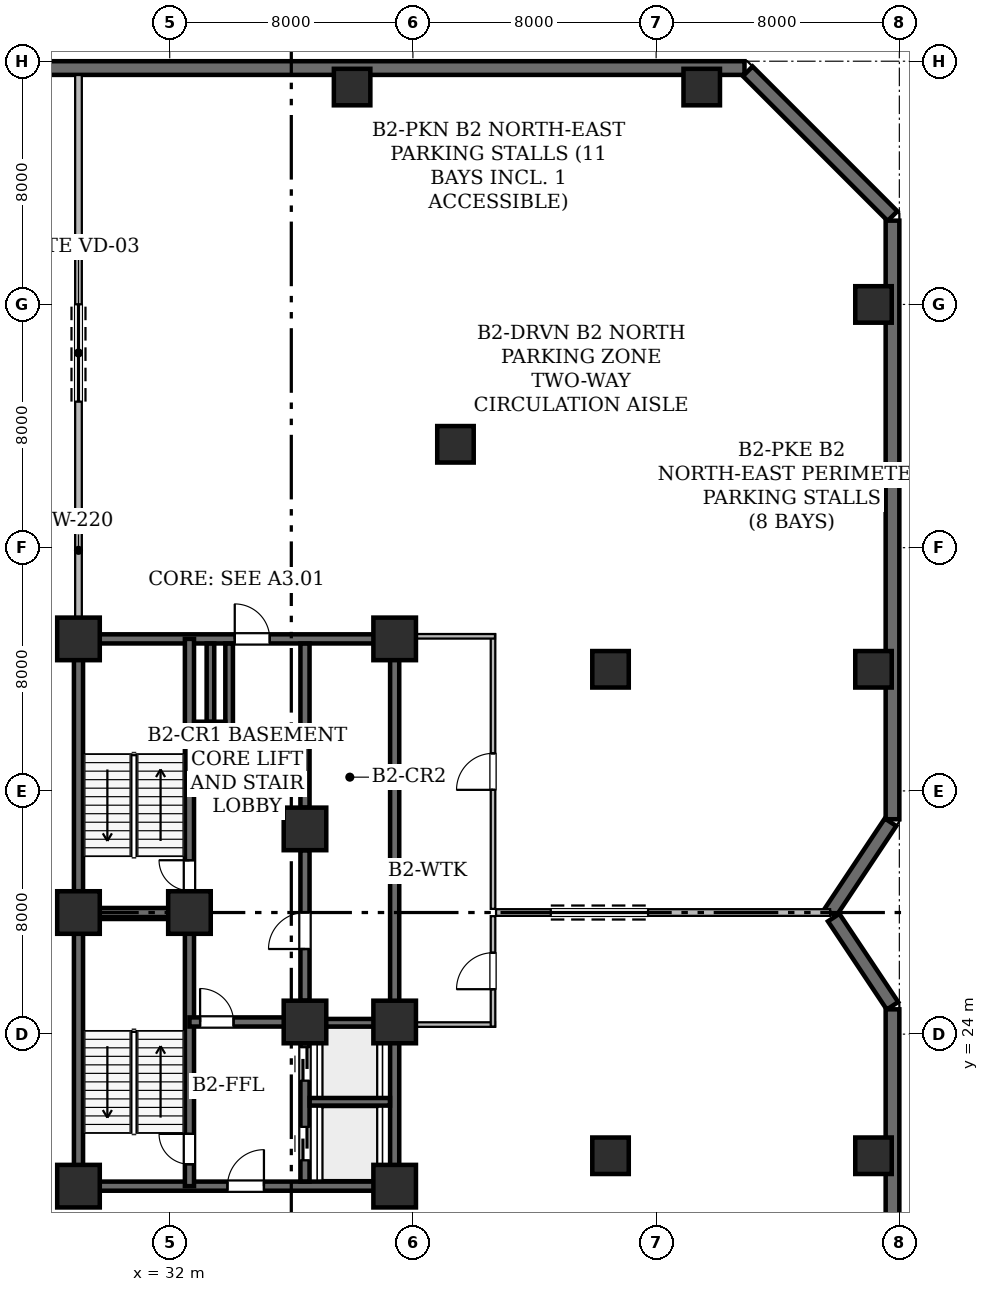
"""IFC4 building model, lengths in metres.
Left out: names, types, materials, properties, quantities, classifications, styles, units other than length and angle.
Written with IfcOpenShell. Run it as: python <this file> out.ifc"""

import sys

from ifc_helpers import new_model, si_unit, direction, frame, frame_2d, origin, origin_2d, place, context, subcontext, project, spatial, rectangle, hollow_rectangle, extrude, element, fill, save


model = new_model("IFC4")
c1 = context("Model", 3, precision=1e-05, world=origin(), true_north=direction((0.0, 1.0)))
c2 = subcontext(c1, "Body", "Model", "MODEL_VIEW")
j1 = project(units=[si_unit("LENGTHUNIT", "METRE"), si_unit("PLANEANGLEUNIT", "RADIAN")], contexts=[c1])
p1 = place(None, origin())
s1 = spatial("IfcSite", under=j1, at=p1, CompositionType="ELEMENT")
p2 = place(p1, origin())
s2 = spatial("IfcBuilding", under=s1, at=p2, CompositionType="ELEMENT")
p3 = place(p2, frame((0.0, 0.0, -9.0)))
s3 = spatial("IfcBuildingStorey", under=s2, at=p3, CompositionType="ELEMENT", Elevation=-9.0)
for number, where, z_axis, x_axis in (
    (1, (29.0, 19.0, 0.0), (0.0, 0.0, 1.0), (1.0, 0.0, 0.0)),
    (2, (32.65, 28.0, 0.0), (0.0, 0.0, 1.0), (1.0, 0.0, 0.0)),
    (3, (39.4, 19.0, 0.0), (0.0, 0.0, 1.0), (1.0, 0.0, 0.0)),
    (4, (29.0, 28.0, 0.0), (0.0, 0.0, 1.0), (1.0, 0.0, 0.0)),
    (5, (36.45, 24.4, 0.0), (0.0, 0.0, 1.0), (1.0, 0.0, 0.0)),
    (6, (39.4, 24.4, 0.0), (0.0, 0.0, 1.0), (1.0, 0.0, 0.0)),
    (7, (29.0, 37.0, 0.0), (0.0, 0.0, 1.0), (1.0, 0.0, 0.0)),
    (8, (36.45, 30.75, 0.0), (0.0, 0.0, 1.0), (1.0, 0.0, 0.0)),
    (9, (39.4, 37.0, 0.0), (0.0, 0.0, 1.0), (1.0, 0.0, 0.0)),
):
    element("IfcColumn", number, at=place(p3, frame(where, z_axis=z_axis, x_axis=x_axis)), inside=s3, PredefinedType="COLUMN", context=c2, shape_type="SweptSolid", body=[
        extrude(hollow_rectangle(XDim=1.4, YDim=1.4, WallThickness=0.07, at=origin_2d()), origin(), (0.0, 0.0, 1.0), 4.5),
    ])
for number, where, z_axis, x_axis in (
    (10, (38.0, 55.15, 0.0), (0.0, 0.0, 1.0), (1.0, 0.0, 0.0)),
    (11, (49.5, 55.15, 0.0), (0.0, 0.0, 1.0), (1.0, 0.0, 0.0)),
    (12, (55.15, 20.0, 0.0), (0.0, 0.0, 1.0), (1.0, 0.0, 0.0)),
    (13, (55.15, 36.0, 0.0), (0.0, 0.0, 1.0), (1.0, 0.0, 0.0)),
    (14, (55.15, 48.0, 0.0), (0.0, 0.0, 1.0), (1.0, 0.0, 0.0)),
    (15, (41.4, 43.4, 0.0), (0.0, 0.0, 1.0), (1.0, 0.0, 0.0)),
    (16, (46.5, 20.0, 0.0), (0.0, 0.0, 1.0), (1.0, 0.0, 0.0)),
    (17, (46.5, 36.0, 0.0), (0.0, 0.0, 1.0), (1.0, 0.0, 0.0)),
):
    element("IfcColumn", number, at=place(p3, frame(where, z_axis=z_axis, x_axis=x_axis)), inside=s3, PredefinedType="COLUMN", context=c2, shape_type="SweptSolid", body=[
        extrude(hollow_rectangle(XDim=1.2, YDim=1.2, WallThickness=0.06, at=origin_2d()), origin(), (0.0, 0.0, 1.0), 4.5),
    ])
p4 = place(p3, frame((5.243, 55.775, 0.0), z_axis=(0.0, 0.0, 1.0), x_axis=(1.0, 0.0, 0.0)))
e18 = element("IfcWall", 18, at=p4, inside=s3, PredefinedType="USERDEFINED", context=c2, shape_type="SweptSolid", body=[
    extrude(rectangle(XDim=45.664, YDim=0.45, at=frame_2d((22.832, 0.0))), origin(), (0.0, 0.0, 1.0), 4.18),
])
p5 = place(p3, frame((51.014, 55.668, 0.0), z_axis=(0.0, 0.0, 1.0), x_axis=(0.707106781187, -0.707106781187, 0.0)))
e19 = element("IfcWall", 19, at=p5, inside=s3, PredefinedType="USERDEFINED", context=c2, shape_type="SweptSolid", body=[
    extrude(rectangle(XDim=6.733, YDim=0.45, at=frame_2d((3.367, 0.0))), origin(), (0.0, 0.0, 1.0), 4.18),
])
p6 = place(p3, frame((55.775, 50.756, 0.0), z_axis=(0.0, 0.0, 1.0), x_axis=(0.0, -1.0, 0.0)))
e20 = element("IfcWall", 20, at=p6, inside=s3, PredefinedType="USERDEFINED", context=c2, shape_type="SweptSolid", body=[
    extrude(rectangle(XDim=19.688, YDim=0.45, at=frame_2d((9.844, 0.0))), origin(), (0.0, 0.0, 1.0), 4.18),
])
p7 = place(p3, frame((55.71, 30.971, 0.0), z_axis=(0.0, 0.0, 1.0), x_axis=(-0.554573947075, -0.832134446604, 0.0)))
e21 = element("IfcWall", 21, at=p7, inside=s3, PredefinedType="USERDEFINED", context=c2, shape_type="SweptSolid", body=[
    extrude(rectangle(XDim=3.57, YDim=0.45, at=frame_2d((1.785, 0.0))), origin(), (0.0, 0.0, 1.0), 4.18),
])
p8 = place(p3, frame((53.84, 27.835, 0.0), z_axis=(0.0, 0.0, 1.0), x_axis=(0.554587147378, -0.832125649144, 0.0)))
e22 = element("IfcWall", 22, at=p8, inside=s3, PredefinedType="USERDEFINED", context=c2, shape_type="SweptSolid", body=[
    extrude(rectangle(XDim=3.489, YDim=0.45, at=frame_2d((1.744, 0.0))), origin(), (0.0, 0.0, 1.0), 4.18),
])
p9 = place(p3, frame((55.775, 24.816, 0.0), z_axis=(0.0, 0.0, 1.0), x_axis=(0.0, -1.0, 0.0)))
e23 = element("IfcWall", 23, at=p9, inside=s3, PredefinedType="USERDEFINED", context=c2, shape_type="SweptSolid", body=[
    extrude(rectangle(XDim=19.723, YDim=0.45, at=frame_2d((9.861, 0.0))), origin(), (0.0, 0.0, 1.0), 4.18),
])
p10 = place(p3, frame((29.0, 37.154, 0.0), z_axis=(0.0, 0.0, 1.0), x_axis=(0.0, 1.0, 0.0)))
e24 = element("IfcWall", 24, at=p10, inside=s3, PredefinedType="STANDARD", context=c2, shape_type="SweptSolid", body=[
    extrude(rectangle(XDim=18.392, YDim=0.22, at=frame_2d((9.196, 0.0))), origin(), (0.0, 0.0, 1.0), 4.18),
])
p11 = place(p10, frame((7.65, 0.0, 0.0)))
e25 = element("IfcOpeningElement", 25, at=p11, cuts=e24, PredefinedType="OPENING", context=c2, shape_type="SweptSolid", body=[
    extrude(rectangle(XDim=3.2, YDim=2.7, at=frame_2d((1.6, 1.35))), frame((0.0, 0.12, 0.0), z_axis=(0.0, -1.0, 0.0), x_axis=(1.0, 0.0, 0.0)), (0.0, 0.0, 1.0), 0.24),
])
p12 = place(p3, frame((42.735, 28.0, 0.0), z_axis=(0.0, 0.0, 1.0), x_axis=(1.0, 0.0, 0.0)))
e26 = element("IfcWall", 26, at=p12, inside=s3, PredefinedType="STANDARD", context=c2, shape_type="SweptSolid", body=[
    extrude(rectangle(XDim=10.988, YDim=0.22, at=frame_2d((5.494, 0.0))), origin(), (0.0, 0.0, 1.0), 4.18),
])
p13 = place(p12, frame((1.8, 0.0, 0.0)))
e27 = element("IfcOpeningElement", 27, at=p13, cuts=e26, PredefinedType="OPENING", context=c2, shape_type="SweptSolid", body=[
    extrude(rectangle(XDim=3.2, YDim=2.7, at=frame_2d((1.6, 1.35))), frame((0.0, 0.12, 0.0), z_axis=(0.0, -1.0, 0.0), x_axis=(1.0, 0.0, 0.0)), (0.0, 0.0, 1.0), 0.24),
])
for number, where, z_axis, x_axis in (
    (28, (29.0, 19.0, 0.0), (0.0, 0.0, 1.0), (0.0, 1.0, 0.0)),
    (29, (29.0, 28.0, 0.0), (0.0, 0.0, 1.0), (0.0, 1.0, 0.0)),
):
    element("IfcWall", number, at=place(p3, frame(where, z_axis=z_axis, x_axis=x_axis)), inside=s3, PredefinedType="SHEAR", context=c2, shape_type="SweptSolid", body=[
        extrude(rectangle(XDim=9.0, YDim=0.3, at=frame_2d((4.5, 0.0))), origin(), (0.0, 0.0, 1.0), 4.18),
    ])
p14 = place(p3, frame((29.0, 19.0, 0.0), z_axis=(0.0, 0.0, 1.0), x_axis=(1.0, 0.0, 0.0)))
e30 = element("IfcWall", 30, at=p14, inside=s3, PredefinedType="SHEAR", context=c2, shape_type="SweptSolid", body=[
    extrude(rectangle(XDim=10.4, YDim=0.3, at=frame_2d((5.2, 0.0))), origin(), (0.0, 0.0, 1.0), 4.18),
])
p15 = place(p14, frame((4.9, 0.0, 0.0)))
e31 = element("IfcOpeningElement", 31, at=p15, cuts=e30, PredefinedType="OPENING", context=c2, shape_type="SweptSolid", body=[
    extrude(rectangle(XDim=1.2, YDim=2.15, at=frame_2d((0.6, 1.075))), frame((0.0, 0.16, 0.0), z_axis=(0.0, -1.0, 0.0), x_axis=(1.0, 0.0, 0.0)), (0.0, 0.0, 1.0), 0.32),
])
p16 = place(p3, frame((29.0, 37.0, 0.0), z_axis=(0.0, 0.0, 1.0), x_axis=(1.0, 0.0, 0.0)))
e32 = element("IfcWall", 32, at=p16, inside=s3, PredefinedType="SHEAR", context=c2, shape_type="SweptSolid", body=[
    extrude(rectangle(XDim=10.4, YDim=0.3, at=frame_2d((5.2, 0.0))), origin(), (0.0, 0.0, 1.0), 4.18),
])
p17 = place(p16, frame((5.14, 0.0, 0.0)))
e33 = element("IfcOpeningElement", 33, at=p17, cuts=e32, PredefinedType="OPENING", context=c2, shape_type="SweptSolid", body=[
    extrude(rectangle(XDim=1.15, YDim=2.2, at=frame_2d((0.575, 1.1))), frame((0.0, 0.16, 0.0), z_axis=(0.0, -1.0, 0.0), x_axis=(1.0, 0.0, 0.0)), (0.0, 0.0, 1.0), 0.32),
])
p18 = place(p3, frame((39.4, 19.0, 0.0), z_axis=(0.0, 0.0, 1.0), x_axis=(0.0, 1.0, 0.0)))
e34 = element("IfcWall", 34, at=p18, inside=s3, PredefinedType="SHEAR", context=c2, shape_type="SweptSolid", body=[
    extrude(rectangle(XDim=5.4, YDim=0.3, at=frame_2d((2.7, 0.0))), origin(), (0.0, 0.0, 1.0), 4.18),
])
p19 = place(p3, frame((39.4, 24.4, 0.0), z_axis=(0.0, 0.0, 1.0), x_axis=(0.0, 1.0, 0.0)))
e35 = element("IfcWall", 35, at=p19, inside=s3, PredefinedType="SHEAR", context=c2, shape_type="SweptSolid", body=[
    extrude(rectangle(XDim=12.6, YDim=0.3, at=frame_2d((6.3, 0.0))), origin(), (0.0, 0.0, 1.0), 4.18),
])
p20 = place(p3, frame((32.65, 19.0, 0.0), z_axis=(0.0, 0.0, 1.0), x_axis=(0.0, 1.0, 0.0)))
e36 = element("IfcWall", 36, at=p20, inside=s3, PredefinedType="SHEAR", context=c2, shape_type="SweptSolid", body=[
    extrude(rectangle(XDim=9.0, YDim=0.3, at=frame_2d((4.5, 0.0))), origin(), (0.0, 0.0, 1.0), 4.18),
])
p21 = place(p20, frame((0.72, 0.0, 0.0)))
e37 = element("IfcOpeningElement", 37, at=p21, cuts=e36, PredefinedType="OPENING", context=c2, shape_type="SweptSolid", body=[
    extrude(rectangle(XDim=1.0, YDim=2.15, at=frame_2d((0.5, 1.075))), frame((0.0, 0.16, 0.0), z_axis=(0.0, -1.0, 0.0), x_axis=(1.0, 0.0, 0.0)), (0.0, 0.0, 1.0), 0.32),
])
p22 = place(p3, frame((32.65, 28.0, 0.0), z_axis=(0.0, 0.0, 1.0), x_axis=(0.0, 1.0, 0.0)))
e38 = element("IfcWall", 38, at=p22, inside=s3, PredefinedType="SHEAR", context=c2, shape_type="SweptSolid", body=[
    extrude(rectangle(XDim=9.0, YDim=0.3, at=frame_2d((4.5, 0.0))), origin(), (0.0, 0.0, 1.0), 4.18),
])
p23 = place(p22, frame((0.72, 0.0, 0.0)))
e39 = element("IfcOpeningElement", 39, at=p23, cuts=e38, PredefinedType="OPENING", context=c2, shape_type="SweptSolid", body=[
    extrude(rectangle(XDim=1.0, YDim=2.15, at=frame_2d((0.5, 1.075))), frame((0.0, 0.16, 0.0), z_axis=(0.0, -1.0, 0.0), x_axis=(1.0, 0.0, 0.0)), (0.0, 0.0, 1.0), 0.32),
])
p24 = place(p3, frame((29.0, 28.0, 0.0), z_axis=(0.0, 0.0, 1.0), x_axis=(1.0, 0.0, 0.0)))
e40 = element("IfcWall", 40, at=p24, inside=s3, PredefinedType="SHEAR", context=c2, shape_type="SweptSolid", body=[
    extrude(rectangle(XDim=3.65, YDim=0.3, at=frame_2d((1.825, 0.0))), origin(), (0.0, 0.0, 1.0), 4.18),
])
p25 = place(p3, frame((32.65, 24.4, 0.0), z_axis=(0.0, 0.0, 1.0), x_axis=(1.0, 0.0, 0.0)))
e41 = element("IfcWall", 41, at=p25, inside=s3, PredefinedType="SHEAR", context=c2, shape_type="SweptSolid", body=[
    extrude(rectangle(XDim=3.8, YDim=0.3, at=frame_2d((1.9, 0.0))), origin(), (0.0, 0.0, 1.0), 4.18),
])
p26 = place(p25, frame((0.35, 0.0, 0.0)))
e42 = element("IfcOpeningElement", 42, at=p26, cuts=e41, PredefinedType="OPENING", context=c2, shape_type="SweptSolid", body=[
    extrude(rectangle(XDim=1.1, YDim=2.15, at=frame_2d((0.55, 1.075))), frame((0.0, 0.16, 0.0), z_axis=(0.0, -1.0, 0.0), x_axis=(1.0, 0.0, 0.0)), (0.0, 0.0, 1.0), 0.32),
])
p27 = place(p3, frame((36.45, 19.154, 0.0), z_axis=(0.0, 0.0, 1.0), x_axis=(0.0, 1.0, 0.0)))
e43 = element("IfcWall", 43, at=p27, inside=s3, PredefinedType="SHEAR", context=c2, shape_type="SweptSolid", body=[
    extrude(rectangle(XDim=4.546, YDim=0.3, at=frame_2d((2.273, 0.0))), origin(), (0.0, 0.0, 1.0), 4.18),
])
p28 = place(p27, frame((0.696, 0.0, 0.0)))
e44 = element("IfcOpeningElement", 44, at=p28, cuts=e43, PredefinedType="OPENING", context=c2, shape_type="SweptSolid", body=[
    extrude(rectangle(XDim=1.1, YDim=2.15, at=frame_2d((0.55, 1.075))), frame((0.0, 0.16, 0.0), z_axis=(0.0, -1.0, 0.0), x_axis=(1.0, 0.0, 0.0)), (0.0, 0.0, 1.0), 0.32),
])
p29 = place(p27, frame((3.316, 0.0, 0.0)))
e45 = element("IfcOpeningElement", 45, at=p29, cuts=e43, PredefinedType="OPENING", context=c2, shape_type="SweptSolid", body=[
    extrude(rectangle(XDim=1.1, YDim=2.15, at=frame_2d((0.55, 1.075))), frame((0.0, 0.16, 0.0), z_axis=(0.0, -1.0, 0.0), x_axis=(1.0, 0.0, 0.0)), (0.0, 0.0, 1.0), 0.32),
])
p30 = place(p3, frame((36.45, 25.1, 0.0), z_axis=(0.0, 0.0, 1.0), x_axis=(0.0, 1.0, 0.0)))
e46 = element("IfcWall", 46, at=p30, inside=s3, PredefinedType="SHEAR", context=c2, shape_type="SweptSolid", body=[
    extrude(rectangle(XDim=4.95, YDim=0.3, at=frame_2d((2.475, 0.0))), origin(), (0.0, 0.0, 1.0), 4.18),
])
p31 = place(p30, frame((1.7, 0.0, 0.0)))
e47 = element("IfcOpeningElement", 47, at=p31, cuts=e46, PredefinedType="OPENING", context=c2, shape_type="SweptSolid", body=[
    extrude(rectangle(XDim=1.2, YDim=2.15, at=frame_2d((0.6, 1.075))), frame((0.0, 0.16, 0.0), z_axis=(0.0, -1.0, 0.0), x_axis=(1.0, 0.0, 0.0)), (0.0, 0.0, 1.0), 0.32),
])
p32 = place(p3, frame((36.45, 31.45, 0.0), z_axis=(0.0, 0.0, 1.0), x_axis=(0.0, 1.0, 0.0)))
e48 = element("IfcWall", 48, at=p32, inside=s3, PredefinedType="SHEAR", context=c2, shape_type="SweptSolid", body=[
    extrude(rectangle(XDim=5.396, YDim=0.3, at=frame_2d((2.698, 0.0))), origin(), (0.0, 0.0, 1.0), 4.18),
])
for number, where, z_axis, x_axis in (
    (49, (36.604, 21.775, 0.0), (0.0, 0.0, 1.0), (1.0, 0.0, 0.0)),
    (50, (36.604, 24.375, 0.0), (0.0, 0.0, 1.0), (1.0, 0.0, 0.0)),
):
    element("IfcWall", number, at=place(p3, frame(where, z_axis=z_axis, x_axis=x_axis)), inside=s3, PredefinedType="SHEAR", context=c2, shape_type="SweptSolid", body=[
        extrude(rectangle(XDim=2.642, YDim=0.25, at=frame_2d((1.321, 0.0))), origin(), (0.0, 0.0, 1.0), 4.18),
    ])
p33 = place(p3, frame((33.955, 34.025, 0.0), z_axis=(0.0, 0.0, 1.0), x_axis=(0.0, 1.0, 0.0)))
e51 = element("IfcWall", 51, at=p33, inside=s3, PredefinedType="SHEAR", context=c2, shape_type="SweptSolid", body=[
    extrude(rectangle(XDim=2.821, YDim=0.25, at=frame_2d((1.411, 0.0))), origin(), (0.0, 0.0, 1.0), 4.18),
])
p34 = place(p3, frame((32.804, 34.15, 0.0), z_axis=(0.0, 0.0, 1.0), x_axis=(1.0, 0.0, 0.0)))
e52 = element("IfcWall", 52, at=p34, inside=s3, PredefinedType="SHEAR", context=c2, shape_type="SweptSolid", body=[
    extrude(rectangle(XDim=1.022, YDim=0.25, at=frame_2d((0.511, 0.0))), origin(), (0.0, 0.0, 1.0), 4.18),
])
p35 = place(p3, frame((33.34, 34.279, 0.0), z_axis=(0.0, 0.0, 1.0), x_axis=(0.0, 1.0, 0.0)))
e53 = element("IfcWall", 53, at=p35, inside=s3, PredefinedType="SHEAR", context=c2, shape_type="SweptSolid", body=[
    extrude(rectangle(XDim=2.567, YDim=0.25, at=frame_2d((1.283, 0.0))), origin(), (0.0, 0.0, 1.0), 4.18),
])
p36 = place(p3, frame((39.542, 24.315, 0.0), z_axis=(0.0, 0.0, 1.0), x_axis=(1.0, 0.0, 0.0)))
e54 = element("IfcWall", 54, at=p36, inside=s3, PredefinedType="STANDARD", context=c2, shape_type="SweptSolid", body=[
    extrude(rectangle(XDim=3.158, YDim=0.15, at=frame_2d((1.579, 0.0))), origin(), (0.0, 0.0, 1.0), 3.315),
])
p37 = place(p3, frame((42.635, 24.25, 0.0), z_axis=(0.0, 0.0, 1.0), x_axis=(0.0, 1.0, 0.0)))
e55 = element("IfcWall", 55, at=p37, inside=s3, PredefinedType="STANDARD", context=c2, shape_type="SweptSolid", body=[
    extrude(rectangle(XDim=3.63, YDim=0.15, at=frame_2d((1.815, 0.0))), origin(), (0.0, 0.0, 1.0), 4.18),
])
p38 = place(p37, frame((1.228, 0.0, 0.0)))
e56 = element("IfcOpeningElement", 56, at=p38, cuts=e55, PredefinedType="OPENING", context=c2, shape_type="SweptSolid", body=[
    extrude(rectangle(XDim=1.2, YDim=2.15, at=frame_2d((0.6, 1.075))), frame((0.0, 0.085, 0.0), z_axis=(0.0, -1.0, 0.0), x_axis=(1.0, 0.0, 0.0)), (0.0, 0.0, 1.0), 0.17),
])
p39 = place(p3, frame((42.635, 28.12, 0.0), z_axis=(0.0, 0.0, 1.0), x_axis=(0.0, 1.0, 0.0)))
e57 = element("IfcWall", 57, at=p39, inside=s3, PredefinedType="STANDARD", context=c2, shape_type="SweptSolid", body=[
    extrude(rectangle(XDim=9.03, YDim=0.15, at=frame_2d((4.515, 0.0))), origin(), (0.0, 0.0, 1.0), 3.315),
])
p40 = place(p39, frame((3.915, 0.0, 0.0)))
e58 = element("IfcOpeningElement", 58, at=p40, cuts=e57, PredefinedType="OPENING", context=c2, shape_type="SweptSolid", body=[
    extrude(rectangle(XDim=1.2, YDim=2.15, at=frame_2d((0.6, 1.075))), frame((0.0, 0.085, 0.0), z_axis=(0.0, -1.0, 0.0), x_axis=(1.0, 0.0, 0.0)), (0.0, 0.0, 1.0), 0.17),
])
p41 = place(p3, frame((42.7, 37.085, 0.0), z_axis=(0.0, 0.0, 1.0), x_axis=(-1.0, 0.0, 0.0)))
e59 = element("IfcWall", 59, at=p41, inside=s3, PredefinedType="STANDARD", context=c2, shape_type="SweptSolid", body=[
    extrude(rectangle(XDim=3.243, YDim=0.15, at=frame_2d((1.622, 0.0))), origin(), (0.0, 0.0, 1.0), 3.315),
])
p42 = place(p11, origin())
e60 = element("IfcDoor", 60, at=p42, inside=s3, OperationType="ROLLINGUP", PredefinedType="GATE", context=c2, shape_type="SweptSolid", body=[
    extrude(rectangle(XDim=3.2, YDim=2.7, at=frame_2d((1.6, 1.35))), frame((0.0, 0.025, 0.0), z_axis=(0.0, -1.0, 0.0), x_axis=(1.0, 0.0, 0.0)), (0.0, 0.0, 1.0), 0.05),
])
fill(e25, e60)
p43 = place(p13, origin())
e61 = element("IfcDoor", 61, at=p43, inside=s3, OperationType="ROLLINGUP", PredefinedType="GATE", context=c2, shape_type="SweptSolid", body=[
    extrude(rectangle(XDim=3.2, YDim=2.7, at=frame_2d((1.6, 1.35))), frame((0.0, 0.025, 0.0), z_axis=(0.0, -1.0, 0.0), x_axis=(1.0, 0.0, 0.0)), (0.0, 0.0, 1.0), 0.05),
])
fill(e27, e61)
p44 = place(p21, origin())
e62 = element("IfcDoor", 62, at=p44, inside=s3, OperationType="SINGLE_SWING_RIGHT", PredefinedType="DOOR", context=c2, shape_type="SweptSolid", body=[
    extrude(rectangle(XDim=1.0, YDim=2.15, at=frame_2d((0.5, 1.075))), frame((0.0, 0.025, 0.0), z_axis=(0.0, -1.0, 0.0), x_axis=(1.0, 0.0, 0.0)), (0.0, 0.0, 1.0), 0.05),
])
fill(e37, e62)
p45 = place(p23, origin())
e63 = element("IfcDoor", 63, at=p45, inside=s3, OperationType="SINGLE_SWING_RIGHT", PredefinedType="DOOR", context=c2, shape_type="SweptSolid", body=[
    extrude(rectangle(XDim=1.0, YDim=2.15, at=frame_2d((0.5, 1.075))), frame((0.0, 0.025, 0.0), z_axis=(0.0, -1.0, 0.0), x_axis=(1.0, 0.0, 0.0)), (0.0, 0.0, 1.0), 0.05),
])
fill(e39, e63)
p46 = place(p26, origin())
e64 = element("IfcDoor", 64, at=p46, inside=s3, OperationType="SINGLE_SWING_LEFT", PredefinedType="DOOR", context=c2, shape_type="SweptSolid", body=[
    extrude(rectangle(XDim=1.1, YDim=2.15, at=frame_2d((0.55, 1.075))), frame((0.0, 0.025, 0.0), z_axis=(0.0, -1.0, 0.0), x_axis=(1.0, 0.0, 0.0)), (0.0, 0.0, 1.0), 0.05),
])
fill(e42, e64)
p47 = place(p15, origin())
e65 = element("IfcDoor", 65, at=p47, inside=s3, OperationType="SINGLE_SWING_RIGHT", PredefinedType="DOOR", context=c2, shape_type="SweptSolid", body=[
    extrude(rectangle(XDim=1.2, YDim=2.15, at=frame_2d((0.6, 1.075))), frame((0.0, 0.025, 0.0), z_axis=(0.0, -1.0, 0.0), x_axis=(1.0, 0.0, 0.0)), (0.0, 0.0, 1.0), 0.05),
])
fill(e31, e65)
p48 = place(p17, origin())
e66 = element("IfcDoor", 66, at=p48, inside=s3, OperationType="SINGLE_SWING_LEFT", PredefinedType="DOOR", context=c2, shape_type="SweptSolid", body=[
    extrude(rectangle(XDim=1.15, YDim=2.2, at=frame_2d((0.575, 1.1))), frame((0.0, 0.025, 0.0), z_axis=(0.0, -1.0, 0.0), x_axis=(1.0, 0.0, 0.0)), (0.0, 0.0, 1.0), 0.05),
])
fill(e33, e66)
p49 = place(p31, origin())
e67 = element("IfcDoor", 67, at=p49, inside=s3, OperationType="SINGLE_SWING_LEFT", PredefinedType="DOOR", context=c2, shape_type="SweptSolid", body=[
    extrude(rectangle(XDim=1.2, YDim=2.15, at=frame_2d((0.6, 1.075))), frame((0.0, 0.025, 0.0), z_axis=(0.0, -1.0, 0.0), x_axis=(1.0, 0.0, 0.0)), (0.0, 0.0, 1.0), 0.05),
])
fill(e47, e67)
p50 = place(p28, origin())
e68 = element("IfcDoor", 68, at=p50, inside=s3, OperationType="SLIDING_TO_LEFT", PredefinedType="DOOR", context=c2, shape_type="SweptSolid", body=[
    extrude(rectangle(XDim=1.1, YDim=2.15, at=frame_2d((0.55, 1.075))), frame((0.0, 0.025, 0.0), z_axis=(0.0, -1.0, 0.0), x_axis=(1.0, 0.0, 0.0)), (0.0, 0.0, 1.0), 0.05),
])
fill(e44, e68)
p51 = place(p29, origin())
e69 = element("IfcDoor", 69, at=p51, inside=s3, OperationType="SLIDING_TO_LEFT", PredefinedType="DOOR", context=c2, shape_type="SweptSolid", body=[
    extrude(rectangle(XDim=1.1, YDim=2.15, at=frame_2d((0.55, 1.075))), frame((0.0, 0.025, 0.0), z_axis=(0.0, -1.0, 0.0), x_axis=(1.0, 0.0, 0.0)), (0.0, 0.0, 1.0), 0.05),
])
fill(e45, e69)
p52 = place(p38, origin())
e70 = element("IfcDoor", 70, at=p52, inside=s3, OperationType="SINGLE_SWING_LEFT", PredefinedType="DOOR", context=c2, shape_type="SweptSolid", body=[
    extrude(rectangle(XDim=1.2, YDim=2.15, at=frame_2d((0.6, 1.075))), frame((0.0, 0.025, 0.0), z_axis=(0.0, -1.0, 0.0), x_axis=(1.0, 0.0, 0.0)), (0.0, 0.0, 1.0), 0.05),
])
fill(e56, e70)
p53 = place(p40, origin())
e71 = element("IfcDoor", 71, at=p53, inside=s3, OperationType="SINGLE_SWING_LEFT", PredefinedType="DOOR", context=c2, shape_type="SweptSolid", body=[
    extrude(rectangle(XDim=1.2, YDim=2.15, at=frame_2d((0.6, 1.075))), frame((0.0, 0.025, 0.0), z_axis=(0.0, -1.0, 0.0), x_axis=(1.0, 0.0, 0.0)), (0.0, 0.0, 1.0), 0.05),
])
fill(e58, e71)
save(model, sys.argv[1])
